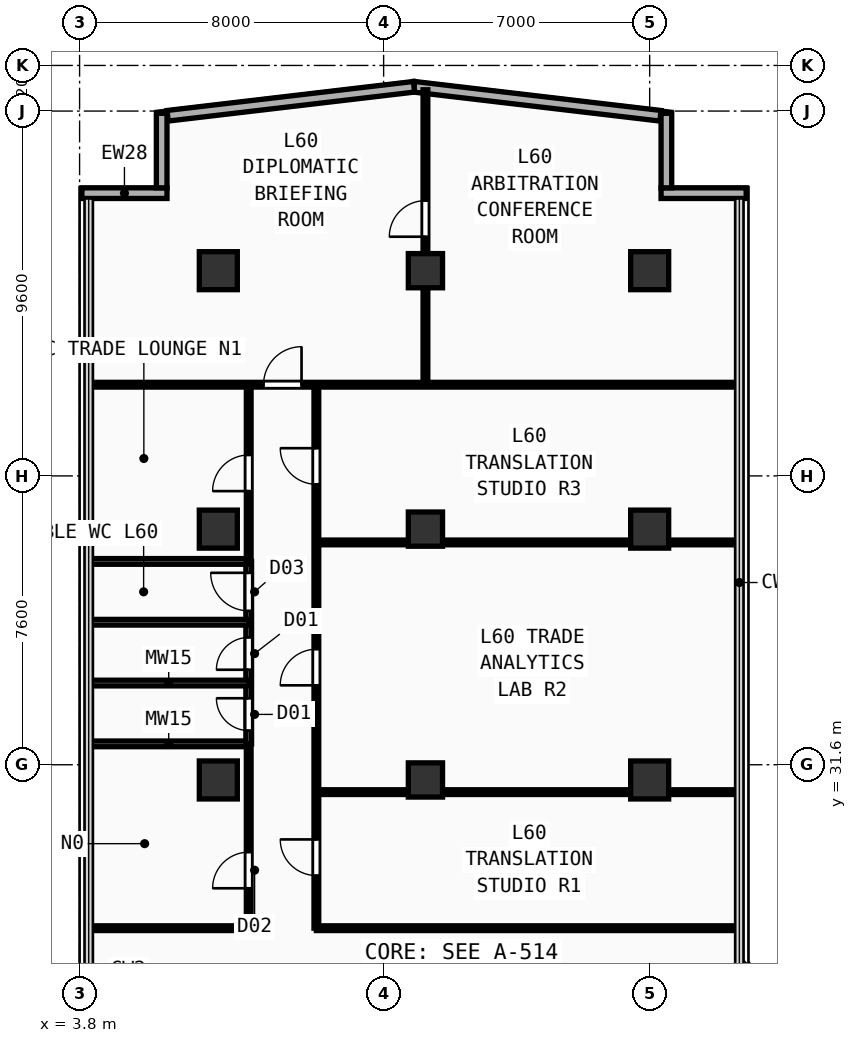
"""IFC4 building model, lengths in metres.
Left out: names, types, materials, properties, quantities, classifications, styles, units other than length and angle.
Written with IfcOpenShell. Run it as: python <this file> out.ifc"""

import sys

from ifc_helpers import new_model, si_unit, direction, frame, frame_2d, origin, origin_2d, place, context, subcontext, project, spatial, rectangle, extrude, element, fill, save


model = new_model("IFC4")
c1 = context("Model", 3, precision=1e-05, world=origin(), true_north=direction((0.0, 1.0)))
c2 = subcontext(c1, "Body", "Model", "MODEL_VIEW")
j1 = project(units=[si_unit("LENGTHUNIT", "METRE"), si_unit("PLANEANGLEUNIT", "RADIAN")], contexts=[c1])
p1 = place(None, origin())
s1 = spatial("IfcSite", under=j1, at=p1, CompositionType="ELEMENT")
p2 = place(p1, origin())
s2 = spatial("IfcBuilding", under=s1, at=p2, CompositionType="ELEMENT")
p3 = place(p2, frame((0.0, 0.0, 234.9)))
s3 = spatial("IfcBuildingStorey", under=s2, at=p3, CompositionType="ELEMENT", Elevation=234.9)
for number, where, z_axis, x_axis in (
    (1, (7.45, 31.2, 0.0), (0.0, 0.0, 1.0), (1.0, 0.0, 0.0)),
    (2, (7.45, 37.8, 0.0), (0.0, 0.0, 1.0), (1.0, 0.0, 0.0)),
    (3, (7.45, 44.6, 0.0), (0.0, 0.0, 1.0), (1.0, 0.0, 0.0)),
    (4, (18.8, 31.2, 0.0), (0.0, 0.0, 1.0), (1.0, 0.0, 0.0)),
    (5, (18.8, 37.8, 0.0), (0.0, 0.0, 1.0), (1.0, 0.0, 0.0)),
    (6, (18.8, 44.6, 0.0), (0.0, 0.0, 1.0), (1.0, 0.0, 0.0)),
):
    element("IfcColumn", number, at=place(p3, frame(where, z_axis=z_axis, x_axis=x_axis)), inside=s3, PredefinedType="COLUMN", context=c2, shape_type="SweptSolid", body=[
        extrude(rectangle(XDim=1.0, YDim=1.0, at=origin_2d()), origin(), (0.0, 0.0, 1.0), 3.56),
    ])
for number, where, z_axis, x_axis in (
    (7, (12.9, 31.2, 0.0), (0.0, 0.0, 1.0), (1.0, 0.0, 0.0)),
    (8, (12.9, 37.8, 0.0), (0.0, 0.0, 1.0), (1.0, 0.0, 0.0)),
    (9, (12.9, 44.6, 0.0), (0.0, 0.0, 1.0), (1.0, 0.0, 0.0)),
):
    element("IfcColumn", number, at=place(p3, frame(where, z_axis=z_axis, x_axis=x_axis)), inside=s3, PredefinedType="COLUMN", context=c2, shape_type="SweptSolid", body=[
        extrude(rectangle(XDim=0.9, YDim=0.9, at=origin_2d()), origin(), (0.0, 0.0, 1.0), 3.56),
    ])
p4 = place(p3, frame((19.1, 46.64, 0.0), z_axis=(0.0, 0.0, 1.0), x_axis=(1.0, 0.0, 0.0)))
e10 = element("IfcWall", 10, at=p4, inside=s3, PredefinedType="SOLIDWALL", context=c2, shape_type="SweptSolid", body=[
    extrude(rectangle(XDim=2.24, YDim=0.28, at=frame_2d((1.12, 0.0))), origin(), (0.0, 0.0, 1.0), 3.56),
])
p5 = place(p3, frame((19.24, 46.78, 0.0), z_axis=(0.0, 0.0, 1.0), x_axis=(0.0, 1.0, 0.0)))
e11 = element("IfcWall", 11, at=p5, inside=s3, PredefinedType="SOLIDWALL", context=c2, shape_type="SweptSolid", body=[
    extrude(rectangle(XDim=1.96, YDim=0.28, at=frame_2d((0.98, 0.0))), origin(), (0.0, 0.0, 1.0), 3.56),
])
p6 = place(p3, frame((3.86, 46.64, 0.0), z_axis=(0.0, 0.0, 1.0), x_axis=(1.0, 0.0, 0.0)))
e12 = element("IfcWall", 12, at=p6, inside=s3, PredefinedType="SOLIDWALL", context=c2, shape_type="SweptSolid", body=[
    extrude(rectangle(XDim=2.24, YDim=0.28, at=frame_2d((1.12, 0.0))), origin(), (0.0, 0.0, 1.0), 3.56),
])
p7 = place(p3, frame((5.96, 46.78, 0.0), z_axis=(0.0, 0.0, 1.0), x_axis=(0.0, 1.0, 0.0)))
e13 = element("IfcWall", 13, at=p7, inside=s3, PredefinedType="SOLIDWALL", context=c2, shape_type="SweptSolid", body=[
    extrude(rectangle(XDim=1.96, YDim=0.28, at=frame_2d((0.98, 0.0))), origin(), (0.0, 0.0, 1.0), 3.56),
])
p8 = place(p3, frame((27.685, 19.775, 0.0), z_axis=(0.0, 0.0, 1.0), x_axis=(-0.707106781187, 0.707106781187, 0.0)))
e14 = element("IfcWall", 14, at=p8, inside=s3, PredefinedType="SOLIDWALL", context=c2, shape_type="SweptSolid", body=[
    extrude(rectangle(XDim=9.207, YDim=0.28, at=frame_2d((4.603, 0.0))), origin(), (0.0, 0.0, 1.0), 3.56),
])
for number, where, z_axis, x_axis in (
    (15, (19.083, 48.676, 0.0), (0.0, 0.0, 1.0), (-0.993, 0.117, 0.0)),
    (16, (12.599, 49.439, 0.0), (0.0, 0.0, 1.0), (-0.993, -0.117, 0.0)),
):
    element("IfcWall", number, at=place(p3, frame(where, z_axis=z_axis, x_axis=x_axis)), inside=s3, PredefinedType="SOLIDWALL", context=c2, shape_type="SweptSolid", body=[
        extrude(rectangle(XDim=6.527, YDim=0.28, at=frame_2d((3.263, 0.0))), origin(), (0.0, 0.0, 1.0), 3.56),
    ])
p9 = place(p3, frame((8.25, 27.3, 0.0), z_axis=(0.0, 0.0, 1.0), x_axis=(0.0, 1.0, 0.0)))
e17 = element("IfcWall", 17, at=p9, inside=s3, PredefinedType="PARTITIONING", context=c2, shape_type="SweptSolid", body=[
    extrude(rectangle(XDim=4.85, YDim=0.125, at=frame_2d((2.425, 0.0))), origin(), (0.0, 0.0, 1.0), 3.56),
])
p10 = place(p9, frame((1.05, 0.0, 0.0)))
e18 = element("IfcOpeningElement", 18, at=p10, cuts=e17, PredefinedType="OPENING", context=c2, shape_type="SweptSolid", body=[
    extrude(rectangle(XDim=0.95, YDim=2.15, at=frame_2d((0.475, 1.075))), frame((0.0, 0.073, 0.0), z_axis=(0.0, -1.0, 0.0), x_axis=(1.0, 0.0, 0.0)), (0.0, 0.0, 1.0), 0.145),
])
p11 = place(p3, frame((4.04, 27.3, 0.0), z_axis=(0.0, 0.0, 1.0), x_axis=(1.0, 0.0, 0.0)))
e19 = element("IfcWall", 19, at=p11, inside=s3, PredefinedType="PARTITIONING", context=c2, shape_type="SweptSolid", body=[
    extrude(rectangle(XDim=4.21, YDim=0.125, at=frame_2d((2.105, 0.0))), origin(), (0.0, 0.0, 1.0), 3.56),
])
p12 = place(p3, frame((4.04, 32.15, 0.0), z_axis=(0.0, 0.0, 1.0), x_axis=(1.0, 0.0, 0.0)))
e20 = element("IfcWall", 20, at=p12, inside=s3, PredefinedType="PLUMBINGWALL", context=c2, shape_type="SweptSolid", body=[
    extrude(rectangle(XDim=4.21, YDim=0.15, at=frame_2d((2.105, 0.0))), origin(), (0.0, 0.0, 1.0), 3.56),
])
p13 = place(p3, frame((8.25, 32.15, 0.0), z_axis=(0.0, 0.0, 1.0), x_axis=(0.0, 1.0, 0.0)))
e21 = element("IfcWall", 21, at=p13, inside=s3, PredefinedType="PLUMBINGWALL", context=c2, shape_type="SweptSolid", body=[
    extrude(rectangle(XDim=4.8, YDim=0.15, at=frame_2d((2.4, 0.0))), origin(), (0.0, 0.0, 1.0), 3.56),
])
p14 = place(p13, frame((0.35, 0.0, 0.0)))
e22 = element("IfcOpeningElement", 22, at=p14, cuts=e21, PredefinedType="OPENING", context=c2, shape_type="SweptSolid", body=[
    extrude(rectangle(XDim=0.85, YDim=2.15, at=frame_2d((0.425, 1.075))), frame((0.0, 0.085, 0.0), z_axis=(0.0, -1.0, 0.0), x_axis=(1.0, 0.0, 0.0)), (0.0, 0.0, 1.0), 0.17),
])
p15 = place(p13, frame((1.95, 0.0, 0.0)))
e23 = element("IfcOpeningElement", 23, at=p15, cuts=e21, PredefinedType="OPENING", context=c2, shape_type="SweptSolid", body=[
    extrude(rectangle(XDim=0.85, YDim=2.15, at=frame_2d((0.425, 1.075))), frame((0.0, 0.085, 0.0), z_axis=(0.0, -1.0, 0.0), x_axis=(1.0, 0.0, 0.0)), (0.0, 0.0, 1.0), 0.17),
])
p16 = place(p13, frame((3.5, 0.0, 0.0)))
e24 = element("IfcOpeningElement", 24, at=p16, cuts=e21, PredefinedType="OPENING", context=c2, shape_type="SweptSolid", body=[
    extrude(rectangle(XDim=1.0, YDim=2.2, at=frame_2d((0.5, 1.1))), frame((0.0, 0.085, 0.0), z_axis=(0.0, -1.0, 0.0), x_axis=(1.0, 0.0, 0.0)), (0.0, 0.0, 1.0), 0.17),
])
for number, where, z_axis, x_axis in (
    (25, (4.04, 33.75, 0.0), (0.0, 0.0, 1.0), (1.0, 0.0, 0.0)),
    (26, (4.04, 35.35, 0.0), (0.0, 0.0, 1.0), (1.0, 0.0, 0.0)),
):
    element("IfcWall", number, at=place(p3, frame(where, z_axis=z_axis, x_axis=x_axis)), inside=s3, PredefinedType="PLUMBINGWALL", context=c2, shape_type="SweptSolid", body=[
        extrude(rectangle(XDim=4.21, YDim=0.15, at=frame_2d((2.105, 0.0))), origin(), (0.0, 0.0, 1.0), 3.2),
    ])
p17 = place(p3, frame((4.04, 36.95, 0.0), z_axis=(0.0, 0.0, 1.0), x_axis=(1.0, 0.0, 0.0)))
e27 = element("IfcWall", 27, at=p17, inside=s3, PredefinedType="PLUMBINGWALL", context=c2, shape_type="SweptSolid", body=[
    extrude(rectangle(XDim=4.21, YDim=0.15, at=frame_2d((2.105, 0.0))), origin(), (0.0, 0.0, 1.0), 3.56),
])
p18 = place(p3, frame((8.25, 36.95, 0.0), z_axis=(0.0, 0.0, 1.0), x_axis=(0.0, 1.0, 0.0)))
e28 = element("IfcWall", 28, at=p18, inside=s3, PredefinedType="PARTITIONING", context=c2, shape_type="SweptSolid", body=[
    extrude(rectangle(XDim=4.65, YDim=0.125, at=frame_2d((2.325, 0.0))), origin(), (0.0, 0.0, 1.0), 3.56),
])
p19 = place(p18, frame((1.85, 0.0, 0.0)))
e29 = element("IfcOpeningElement", 29, at=p19, cuts=e28, PredefinedType="OPENING", context=c2, shape_type="SweptSolid", body=[
    extrude(rectangle(XDim=0.95, YDim=2.15, at=frame_2d((0.475, 1.075))), frame((0.0, 0.073, 0.0), z_axis=(0.0, -1.0, 0.0), x_axis=(1.0, 0.0, 0.0)), (0.0, 0.0, 1.0), 0.145),
])
p20 = place(p3, frame((4.04, 41.6, 0.0), z_axis=(0.0, 0.0, 1.0), x_axis=(1.0, 0.0, 0.0)))
e30 = element("IfcWall", 30, at=p20, inside=s3, PredefinedType="PARTITIONING", context=c2, shape_type="SweptSolid", body=[
    extrude(rectangle(XDim=17.12, YDim=0.125, at=frame_2d((8.56, 0.0))), origin(), (0.0, 0.0, 1.0), 3.56),
])
p21 = place(p20, frame((4.6, 0.0, 0.0)))
e31 = element("IfcOpeningElement", 31, at=p21, cuts=e30, PredefinedType="OPENING", context=c2, shape_type="SweptSolid", body=[
    extrude(rectangle(XDim=1.0, YDim=2.2, at=frame_2d((0.5, 1.1))), frame((0.0, 0.073, 0.0), z_axis=(0.0, -1.0, 0.0), x_axis=(1.0, 0.0, 0.0)), (0.0, 0.0, 1.0), 0.145),
])
p22 = place(p3, frame((12.9, 41.6, 0.0), z_axis=(0.0, 0.0, 1.0), x_axis=(0.0, 1.0, 0.0)))
e32 = element("IfcWall", 32, at=p22, inside=s3, PredefinedType="PARTITIONING", context=c2, shape_type="SweptSolid", body=[
    extrude(rectangle(XDim=7.76, YDim=0.125, at=frame_2d((3.88, 0.0))), origin(), (0.0, 0.0, 1.0), 3.16),
])
p23 = place(p22, frame((3.894, 0.0, 0.0)))
e33 = element("IfcOpeningElement", 33, at=p23, cuts=e32, PredefinedType="OPENING", context=c2, shape_type="SweptSolid", body=[
    extrude(rectangle(XDim=0.95, YDim=2.15, at=frame_2d((0.475, 1.075))), frame((0.0, 0.073, 0.0), z_axis=(0.0, -1.0, 0.0), x_axis=(1.0, 0.0, 0.0)), (0.0, 0.0, 1.0), 0.145),
])
p24 = place(p3, frame((10.03, 27.3, 0.0), z_axis=(0.0, 0.0, 1.0), x_axis=(1.0, 0.0, 0.0)))
e34 = element("IfcWall", 34, at=p24, inside=s3, PredefinedType="PARTITIONING", context=c2, shape_type="SweptSolid", body=[
    extrude(rectangle(XDim=11.13, YDim=0.125, at=frame_2d((5.565, 0.0))), origin(), (0.0, 0.0, 1.0), 3.56),
])
p25 = place(p3, frame((10.03, 27.3, 0.0), z_axis=(0.0, 0.0, 1.0), x_axis=(0.0, 1.0, 0.0)))
e35 = element("IfcWall", 35, at=p25, inside=s3, PredefinedType="PARTITIONING", context=c2, shape_type="SweptSolid", body=[
    extrude(rectangle(XDim=14.3, YDim=0.125, at=frame_2d((7.15, 0.0))), origin(), (0.0, 0.0, 1.0), 3.56),
])
p26 = place(p25, frame((1.385, 0.0, 0.0)))
e36 = element("IfcOpeningElement", 36, at=p26, cuts=e35, PredefinedType="OPENING", context=c2, shape_type="SweptSolid", body=[
    extrude(rectangle(XDim=0.95, YDim=2.15, at=frame_2d((0.475, 1.075))), frame((0.0, 0.073, 0.0), z_axis=(0.0, -1.0, 0.0), x_axis=(1.0, 0.0, 0.0)), (0.0, 0.0, 1.0), 0.145),
])
p27 = place(p25, frame((6.39, 0.0, 0.0)))
e37 = element("IfcOpeningElement", 37, at=p27, cuts=e35, PredefinedType="OPENING", context=c2, shape_type="SweptSolid", body=[
    extrude(rectangle(XDim=0.95, YDim=2.15, at=frame_2d((0.475, 1.075))), frame((0.0, 0.073, 0.0), z_axis=(0.0, -1.0, 0.0), x_axis=(1.0, 0.0, 0.0)), (0.0, 0.0, 1.0), 0.145),
])
p28 = place(p25, frame((11.679, 0.0, 0.0)))
e38 = element("IfcOpeningElement", 38, at=p28, cuts=e35, PredefinedType="OPENING", context=c2, shape_type="SweptSolid", body=[
    extrude(rectangle(XDim=0.95, YDim=2.15, at=frame_2d((0.475, 1.075))), frame((0.0, 0.073, 0.0), z_axis=(0.0, -1.0, 0.0), x_axis=(1.0, 0.0, 0.0)), (0.0, 0.0, 1.0), 0.145),
])
for number, where, z_axis, x_axis in (
    (39, (10.03, 30.88, 0.0), (0.0, 0.0, 1.0), (1.0, 0.0, 0.0)),
    (40, (10.03, 37.45, 0.0), (0.0, 0.0, 1.0), (1.0, 0.0, 0.0)),
):
    element("IfcWall", number, at=place(p3, frame(where, z_axis=z_axis, x_axis=x_axis)), inside=s3, PredefinedType="PARTITIONING", context=c2, shape_type="SweptSolid", body=[
        extrude(rectangle(XDim=11.13, YDim=0.125, at=frame_2d((5.565, 0.0))), origin(), (0.0, 0.0, 1.0), 3.16),
    ])
p29 = place(p10, origin())
e41 = element("IfcDoor", 41, at=p29, inside=s3, OperationType="SINGLE_SWING_LEFT", PredefinedType="DOOR", context=c2, shape_type="SweptSolid", body=[
    extrude(rectangle(XDim=0.95, YDim=2.15, at=frame_2d((0.475, 1.075))), frame((0.0, 0.025, 0.0), z_axis=(0.0, -1.0, 0.0), x_axis=(1.0, 0.0, 0.0)), (0.0, 0.0, 1.0), 0.05),
])
fill(e18, e41)
p30 = place(p14, origin())
e42 = element("IfcDoor", 42, at=p30, inside=s3, OperationType="SINGLE_SWING_RIGHT", PredefinedType="DOOR", context=c2, shape_type="SweptSolid", body=[
    extrude(rectangle(XDim=0.85, YDim=2.15, at=frame_2d((0.425, 1.075))), frame((0.0, 0.025, 0.0), z_axis=(0.0, -1.0, 0.0), x_axis=(1.0, 0.0, 0.0)), (0.0, 0.0, 1.0), 0.05),
])
fill(e22, e42)
p31 = place(p15, origin())
e43 = element("IfcDoor", 43, at=p31, inside=s3, OperationType="SINGLE_SWING_LEFT", PredefinedType="DOOR", context=c2, shape_type="SweptSolid", body=[
    extrude(rectangle(XDim=0.85, YDim=2.15, at=frame_2d((0.425, 1.075))), frame((0.0, 0.025, 0.0), z_axis=(0.0, -1.0, 0.0), x_axis=(1.0, 0.0, 0.0)), (0.0, 0.0, 1.0), 0.05),
])
fill(e23, e43)
p32 = place(p16, origin())
e44 = element("IfcDoor", 44, at=p32, inside=s3, OperationType="SINGLE_SWING_RIGHT", PredefinedType="DOOR", context=c2, shape_type="SweptSolid", body=[
    extrude(rectangle(XDim=1.0, YDim=2.2, at=frame_2d((0.5, 1.1))), frame((0.0, 0.025, 0.0), z_axis=(0.0, -1.0, 0.0), x_axis=(1.0, 0.0, 0.0)), (0.0, 0.0, 1.0), 0.05),
])
fill(e24, e44)
p33 = place(p19, origin())
e45 = element("IfcDoor", 45, at=p33, inside=s3, OperationType="SINGLE_SWING_LEFT", PredefinedType="DOOR", context=c2, shape_type="SweptSolid", body=[
    extrude(rectangle(XDim=0.95, YDim=2.15, at=frame_2d((0.475, 1.075))), frame((0.0, 0.025, 0.0), z_axis=(0.0, -1.0, 0.0), x_axis=(1.0, 0.0, 0.0)), (0.0, 0.0, 1.0), 0.05),
])
fill(e29, e45)
p34 = place(p21, origin())
e46 = element("IfcDoor", 46, at=p34, inside=s3, OperationType="SINGLE_SWING_RIGHT", PredefinedType="DOOR", context=c2, shape_type="SweptSolid", body=[
    extrude(rectangle(XDim=1.0, YDim=2.2, at=frame_2d((0.5, 1.1))), frame((0.0, 0.025, 0.0), z_axis=(0.0, -1.0, 0.0), x_axis=(1.0, 0.0, 0.0)), (0.0, 0.0, 1.0), 0.05),
])
fill(e31, e46)
p35 = place(p23, origin())
e47 = element("IfcDoor", 47, at=p35, inside=s3, OperationType="SINGLE_SWING_LEFT", PredefinedType="DOOR", context=c2, shape_type="SweptSolid", body=[
    extrude(rectangle(XDim=0.95, YDim=2.15, at=frame_2d((0.475, 1.075))), frame((0.0, 0.025, 0.0), z_axis=(0.0, -1.0, 0.0), x_axis=(1.0, 0.0, 0.0)), (0.0, 0.0, 1.0), 0.05),
])
fill(e33, e47)
p36 = place(p26, origin())
e48 = element("IfcDoor", 48, at=p36, inside=s3, OperationType="SINGLE_SWING_RIGHT", PredefinedType="DOOR", context=c2, shape_type="SweptSolid", body=[
    extrude(rectangle(XDim=0.95, YDim=2.15, at=frame_2d((0.475, 1.075))), frame((0.0, 0.025, 0.0), z_axis=(0.0, -1.0, 0.0), x_axis=(1.0, 0.0, 0.0)), (0.0, 0.0, 1.0), 0.05),
])
fill(e36, e48)
p37 = place(p27, origin())
e49 = element("IfcDoor", 49, at=p37, inside=s3, OperationType="SINGLE_SWING_LEFT", PredefinedType="DOOR", context=c2, shape_type="SweptSolid", body=[
    extrude(rectangle(XDim=0.95, YDim=2.15, at=frame_2d((0.475, 1.075))), frame((0.0, 0.025, 0.0), z_axis=(0.0, -1.0, 0.0), x_axis=(1.0, 0.0, 0.0)), (0.0, 0.0, 1.0), 0.05),
])
fill(e37, e49)
p38 = place(p28, origin())
e50 = element("IfcDoor", 50, at=p38, inside=s3, OperationType="SINGLE_SWING_RIGHT", PredefinedType="DOOR", context=c2, shape_type="SweptSolid", body=[
    extrude(rectangle(XDim=0.95, YDim=2.15, at=frame_2d((0.475, 1.075))), frame((0.0, 0.025, 0.0), z_axis=(0.0, -1.0, 0.0), x_axis=(1.0, 0.0, 0.0)), (0.0, 0.0, 1.0), 0.05),
])
fill(e38, e50)
save(model, sys.argv[1])
